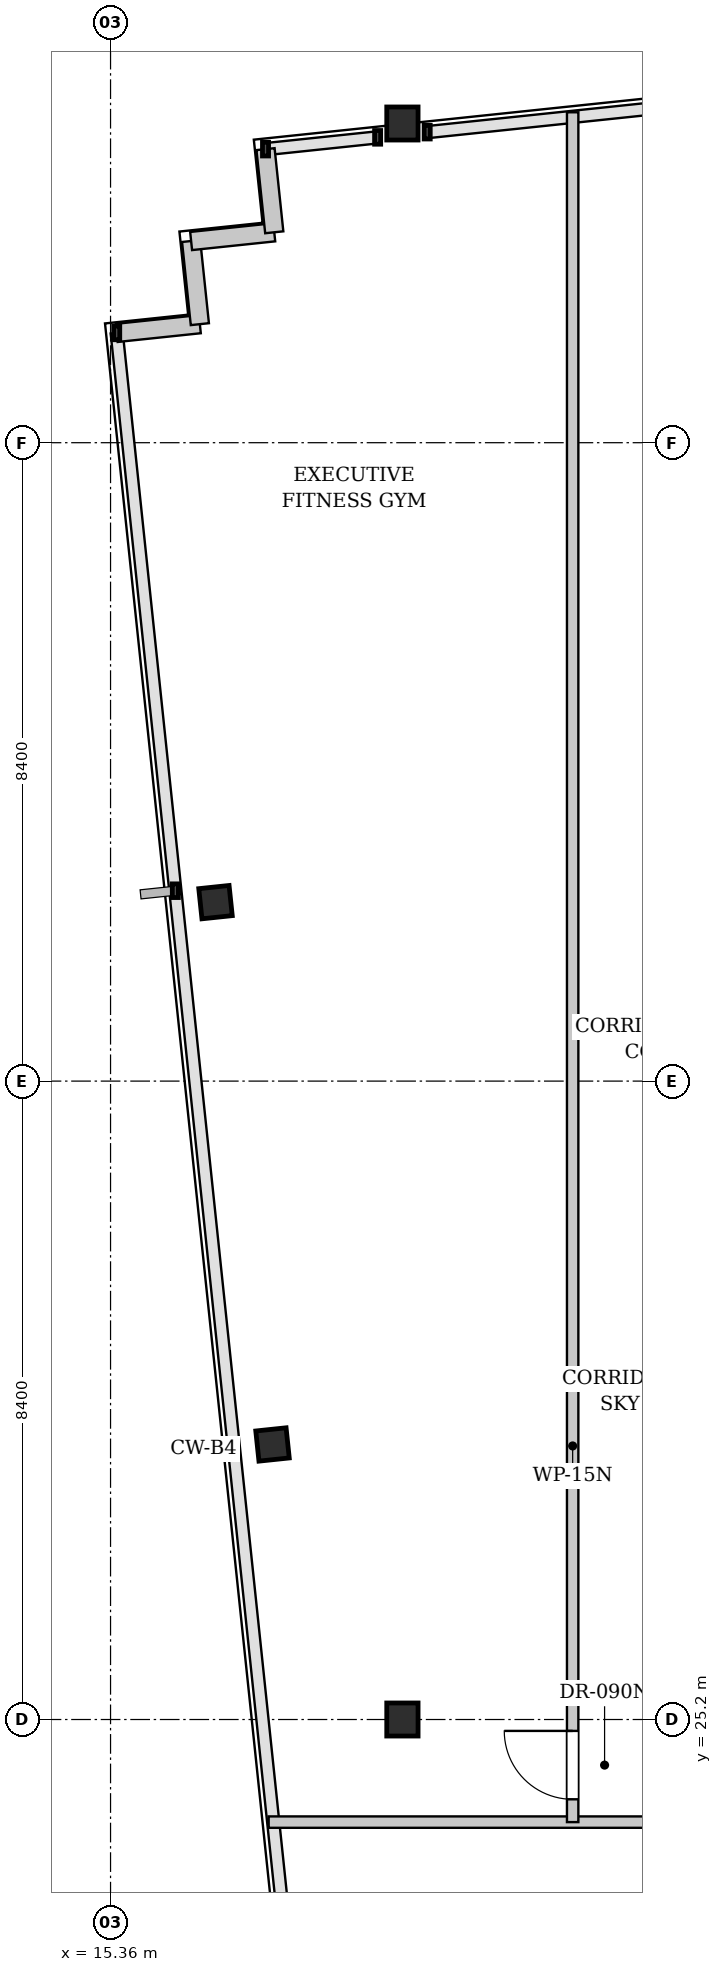
"""IFC4 building model, lengths in metres.
Left out: names, types, materials, properties, quantities, classifications, styles, units other than length and angle.
Written with IfcOpenShell. Run it as: python <this file> out.ifc"""

import sys

from ifc_helpers import new_model, si_unit, direction, frame, frame_2d, origin, origin_2d, place, context, subcontext, project, spatial, rectangle, i_section, extrude, element, fill, save


model = new_model("IFC4")
c1 = context("Model", 3, precision=1e-05, world=origin(), true_north=direction((0.0, 1.0)))
c2 = subcontext(c1, "Body", "Model", "MODEL_VIEW")
j1 = project(units=[si_unit("LENGTHUNIT", "METRE"), si_unit("PLANEANGLEUNIT", "RADIAN")], contexts=[c1])
p1 = place(None, origin())
s1 = spatial("IfcSite", under=j1, at=p1, CompositionType="ELEMENT")
p2 = place(p1, origin())
s2 = spatial("IfcBuilding", under=s1, at=p2, CompositionType="ELEMENT")
p3 = place(p2, frame((0.0, 0.0, 221.0)))
s3 = spatial("IfcBuildingStorey", under=s2, at=p3, CompositionType="ELEMENT", Elevation=221.0)
for number, where, z_axis, x_axis in (
    (1, (19.2, 25.2, 0.0), (0.0, 0.0, 1.0), (1.0, 0.0, 0.0)),
    (2, (19.2, 46.2, 0.0), (0.0, 0.0, 1.0), (1.0, 0.0, 0.0)),
):
    element("IfcColumn", number, at=place(p3, frame(where, z_axis=z_axis, x_axis=x_axis)), inside=s3, PredefinedType="COLUMN", context=c2, shape_type="SweptSolid", body=[
        extrude(i_section(OverallWidth=0.412, OverallDepth=0.435, WebThickness=0.036, FlangeThickness=0.058, FilletRadius=0.015, at=origin_2d()), origin(), (0.0, 0.0, 1.0), 3.3),
    ])
for number, where, z_axis, x_axis in (
    (3, (17.491, 28.819, 0.0), (0.0, 0.0, 1.0), (0.995, 0.105, 0.0)),
    (4, (16.741, 35.955, 0.0), (0.0, 0.0, 1.0), (0.995, 0.105, 0.0)),
):
    element("IfcColumn", number, at=place(p3, frame(where, z_axis=z_axis, x_axis=x_axis)), inside=s3, PredefinedType="COLUMN", context=c2, shape_type="SweptSolid", body=[
        extrude(i_section(OverallWidth=0.401, OverallDepth=0.399, WebThickness=0.025, FlangeThickness=0.04, FilletRadius=0.015, at=origin_2d()), origin(), (0.0, 0.0, 1.0), 3.3),
    ])
p4 = place(p3, frame((15.441, 43.445, 0.0), z_axis=(0.0, 0.0, 1.0), x_axis=(0.994495717747, 0.104777227405, 0.0)))
e5 = element("IfcWall", 5, at=p4, inside=s3, PredefinedType="SOLIDWALL", context=c2, shape_type="SweptSolid", body=[
    extrude(rectangle(XDim=1.1, YDim=0.24, at=frame_2d((0.55, 0.0))), origin(), (0.0, 0.0, 1.0), 3.08),
])
p5 = place(p3, frame((16.535, 43.56, 0.0), z_axis=(0.0, 0.0, 1.0), x_axis=(-0.104315068386, 0.994544300928, 0.0)))
e6 = element("IfcWall", 6, at=p5, inside=s3, PredefinedType="SOLIDWALL", context=c2, shape_type="SweptSolid", body=[
    extrude(rectangle(XDim=1.1, YDim=0.24, at=frame_2d((0.55, 0.0))), origin(), (0.0, 0.0, 1.0), 3.08),
])
p6 = place(p3, frame((16.42, 44.654, 0.0), z_axis=(0.0, 0.0, 1.0), x_axis=(0.994541884982, 0.104338099541, 0.0)))
e7 = element("IfcWall", 7, at=p6, inside=s3, PredefinedType="SOLIDWALL", context=c2, shape_type="SweptSolid", body=[
    extrude(rectangle(XDim=1.1, YDim=0.24, at=frame_2d((0.55, 0.0))), origin(), (0.0, 0.0, 1.0), 3.08),
])
p7 = place(p3, frame((17.514, 44.769, 0.0), z_axis=(0.0, 0.0, 1.0), x_axis=(-0.104534592565, 0.994521251134, 0.0)))
e8 = element("IfcWall", 8, at=p7, inside=s3, PredefinedType="SOLIDWALL", context=c2, shape_type="SweptSolid", body=[
    extrude(rectangle(XDim=1.1, YDim=0.24, at=frame_2d((0.55, 0.0))), origin(), (0.0, 0.0, 1.0), 3.08),
])
p8 = place(p3, frame((17.44, 23.85, 0.0), z_axis=(0.0, 0.0, 1.0), x_axis=(1.0, 0.0, 0.0)))
e9 = element("IfcWall", 9, at=p8, inside=s3, PredefinedType="PARTITIONING", context=c2, shape_type="SweptSolid", body=[
    extrude(rectangle(XDim=16.06, YDim=0.15, at=frame_2d((8.03, 0.0))), origin(), (0.0, 0.0, 1.0), 3.08),
])
p9 = place(p8, frame((7.19, 0.0, 0.0)))
e10 = element("IfcOpeningElement", 10, at=p9, cuts=e9, PredefinedType="OPENING", context=c2, shape_type="SweptSolid", body=[
    extrude(rectangle(XDim=0.95, YDim=2.15, at=frame_2d((0.475, 1.075))), frame((0.0, 0.085, 0.0), z_axis=(0.0, -1.0, 0.0), x_axis=(1.0, 0.0, 0.0)), (0.0, 0.0, 1.0), 0.17),
])
p10 = place(p8, frame((14.88, 0.0, 0.0)))
e11 = element("IfcOpeningElement", 11, at=p10, cuts=e9, PredefinedType="OPENING", context=c2, shape_type="SweptSolid", body=[
    extrude(rectangle(XDim=0.95, YDim=2.15, at=frame_2d((0.475, 1.075))), frame((0.0, 0.085, 0.0), z_axis=(0.0, -1.0, 0.0), x_axis=(1.0, 0.0, 0.0)), (0.0, 0.0, 1.0), 0.17),
])
p11 = place(p3, frame((21.44, 23.85, 0.0), z_axis=(0.0, 0.0, 1.0), x_axis=(0.0, 1.0, 0.0)))
e12 = element("IfcWall", 12, at=p11, inside=s3, PredefinedType="PARTITIONING", context=c2, shape_type="SweptSolid", body=[
    extrude(rectangle(XDim=22.498, YDim=0.15, at=frame_2d((11.249, 0.0))), origin(), (0.0, 0.0, 1.0), 3.08),
])
p12 = place(p11, frame((0.3, 0.0, 0.0)))
e13 = element("IfcOpeningElement", 13, at=p12, cuts=e12, PredefinedType="OPENING", context=c2, shape_type="SweptSolid", body=[
    extrude(rectangle(XDim=0.9, YDim=2.15, at=frame_2d((0.45, 1.075))), frame((0.0, 0.085, 0.0), z_axis=(0.0, -1.0, 0.0), x_axis=(1.0, 0.0, 0.0)), (0.0, 0.0, 1.0), 0.17),
])
p13 = place(p12, origin())
e14 = element("IfcDoor", 14, at=p13, inside=s3, OperationType="SINGLE_SWING_RIGHT", PredefinedType="DOOR", context=c2, shape_type="SweptSolid", body=[
    extrude(rectangle(XDim=0.9, YDim=2.15, at=frame_2d((0.45, 1.075))), frame((0.0, 0.025, 0.0), z_axis=(0.0, -1.0, 0.0), x_axis=(1.0, 0.0, 0.0)), (0.0, 0.0, 1.0), 0.05),
])
fill(e13, e14)
save(model, sys.argv[1])
